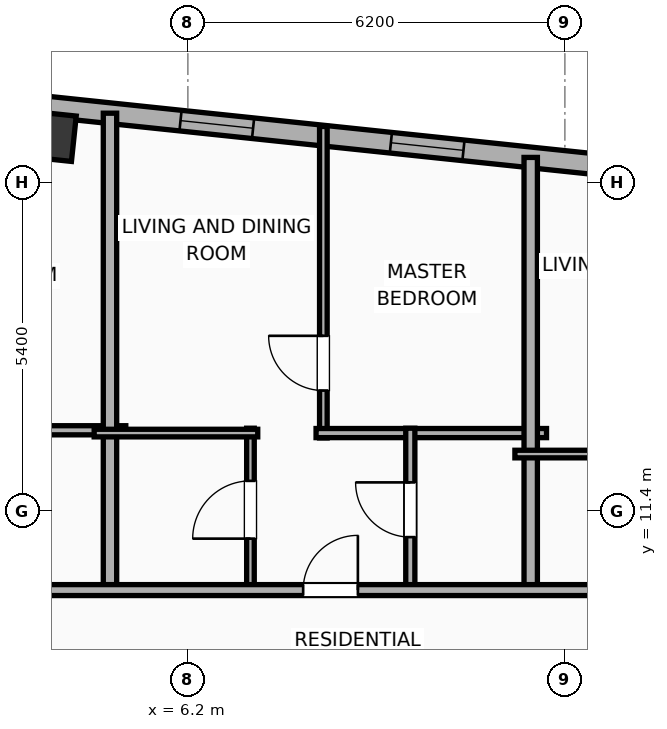
"""IFC4 building model, lengths in metres.
Left out: names, types, materials, properties, quantities, classifications, styles, units other than length and angle.
Written with IfcOpenShell. Run it as: python <this file> out.ifc"""

import sys

from ifc_helpers import new_model, si_unit, direction, frame, frame_2d, origin, origin_2d, place, context, subcontext, project, spatial, rectangle, hollow_rectangle, extrude, element, fill, save


model = new_model("IFC4")
c1 = context("Model", 3, precision=1e-05, world=origin(), true_north=direction((0.0, 1.0)))
c2 = subcontext(c1, "Body", "Model", "MODEL_VIEW")
j1 = project(units=[si_unit("LENGTHUNIT", "METRE"), si_unit("PLANEANGLEUNIT", "RADIAN")], contexts=[c1])
p1 = place(None, origin())
s1 = spatial("IfcSite", under=j1, at=p1, CompositionType="ELEMENT")
p2 = place(p1, origin())
s2 = spatial("IfcBuilding", under=s1, at=p2, CompositionType="ELEMENT")
p3 = place(p2, frame((0.0, 0.0, 299.0)))
s3 = spatial("IfcBuildingStorey", under=s2, at=p3, CompositionType="ELEMENT", Elevation=299.0)
p4 = place(p3, frame((3.952, 17.561, 0.0), z_axis=(0.0, 0.0, 1.0), x_axis=(0.994521895368, -0.104528463268, 0.0)))
e1 = element("IfcColumn", 1, at=p4, inside=s3, PredefinedType="COLUMN", context=c2, shape_type="SweptSolid", body=[
    extrude(hollow_rectangle(XDim=0.75, YDim=0.75, WallThickness=0.025, at=origin_2d()), origin(), (0.0, 0.0, 1.0), 3.9),
])
p5 = place(p3, frame((-23.908, 20.972, 0.0), z_axis=(0.0, 0.0, 1.0), x_axis=(0.994521888554, -0.104528528102, 0.0)))
e2 = element("IfcWall", 2, at=p5, inside=s3, PredefinedType="ELEMENTEDWALL", context=c2, shape_type="SweptSolid", body=[
    extrude(rectangle(XDim=46.766, YDim=0.34, at=frame_2d((23.383, 0.0))), origin(), (0.0, 0.0, 1.0), 3.635),
])
p6 = place(p5, frame((5.644, 0.0, 0.65)))
e3 = element("IfcOpeningElement", 3, at=p6, cuts=e2, PredefinedType="OPENING", context=c2, shape_type="SweptSolid", body=[
    extrude(rectangle(XDim=2.6, YDim=2.45, at=frame_2d((1.3, 1.225))), frame((0.0, 0.18, 0.0), z_axis=(0.0, -1.0, 0.0), x_axis=(1.0, 0.0, 0.0)), (0.0, 0.0, 1.0), 0.36),
])
p7 = place(p5, frame((3.05, 0.0, 0.75)))
e4 = element("IfcOpeningElement", 4, at=p7, cuts=e2, PredefinedType="OPENING", context=c2, shape_type="SweptSolid", body=[
    extrude(rectangle(XDim=1.2, YDim=2.05, at=frame_2d((0.6, 1.025))), frame((0.0, 0.18, 0.0), z_axis=(0.0, -1.0, 0.0), x_axis=(1.0, 0.0, 0.0)), (0.0, 0.0, 1.0), 0.36),
])
p8 = place(p5, frame((9.957, 0.0, 0.75)))
e5 = element("IfcOpeningElement", 5, at=p8, cuts=e2, PredefinedType="OPENING", context=c2, shape_type="SweptSolid", body=[
    extrude(rectangle(XDim=1.2, YDim=2.05, at=frame_2d((0.6, 1.025))), frame((0.0, 0.18, 0.0), z_axis=(0.0, -1.0, 0.0), x_axis=(1.0, 0.0, 0.0)), (0.0, 0.0, 1.0), 0.36),
])
p9 = place(p5, frame((13.05, 0.0, 0.75)))
e6 = element("IfcOpeningElement", 6, at=p9, cuts=e2, PredefinedType="OPENING", context=c2, shape_type="SweptSolid", body=[
    extrude(rectangle(XDim=1.2, YDim=2.05, at=frame_2d((0.6, 1.025))), frame((0.0, 0.18, 0.0), z_axis=(0.0, -1.0, 0.0), x_axis=(1.0, 0.0, 0.0)), (0.0, 0.0, 1.0), 0.36),
])
p10 = place(p5, frame((16.383, 0.0, 0.75)))
e7 = element("IfcOpeningElement", 7, at=p10, cuts=e2, PredefinedType="OPENING", context=c2, shape_type="SweptSolid", body=[
    extrude(rectangle(XDim=1.2, YDim=2.05, at=frame_2d((0.6, 1.025))), frame((0.0, 0.18, 0.0), z_axis=(0.0, -1.0, 0.0), x_axis=(1.0, 0.0, 0.0)), (0.0, 0.0, 1.0), 0.36),
])
p11 = place(p5, frame((19.716, 0.0, 0.75)))
e8 = element("IfcOpeningElement", 8, at=p11, cuts=e2, PredefinedType="OPENING", context=c2, shape_type="SweptSolid", body=[
    extrude(rectangle(XDim=1.2, YDim=2.05, at=frame_2d((0.6, 1.025))), frame((0.0, 0.18, 0.0), z_axis=(0.0, -1.0, 0.0), x_axis=(1.0, 0.0, 0.0)), (0.0, 0.0, 1.0), 0.36),
])
p12 = place(p5, frame((23.195, 0.0, 0.75)))
e9 = element("IfcOpeningElement", 9, at=p12, cuts=e2, PredefinedType="OPENING", context=c2, shape_type="SweptSolid", body=[
    extrude(rectangle(XDim=1.2, YDim=2.05, at=frame_2d((0.6, 1.025))), frame((0.0, 0.18, 0.0), z_axis=(0.0, -1.0, 0.0), x_axis=(1.0, 0.0, 0.0)), (0.0, 0.0, 1.0), 0.36),
])
p13 = place(p5, frame((26.194, 0.0, 0.75)))
e10 = element("IfcOpeningElement", 10, at=p13, cuts=e2, PredefinedType="OPENING", context=c2, shape_type="SweptSolid", body=[
    extrude(rectangle(XDim=1.2, YDim=2.05, at=frame_2d((0.6, 1.025))), frame((0.0, 0.18, 0.0), z_axis=(0.0, -1.0, 0.0), x_axis=(1.0, 0.0, 0.0)), (0.0, 0.0, 1.0), 0.36),
])
p14 = place(p5, frame((30.152, 0.0, 0.75)))
e11 = element("IfcOpeningElement", 11, at=p14, cuts=e2, PredefinedType="OPENING", context=c2, shape_type="SweptSolid", body=[
    extrude(rectangle(XDim=1.2, YDim=2.05, at=frame_2d((0.6, 1.025))), frame((0.0, 0.18, 0.0), z_axis=(0.0, -1.0, 0.0), x_axis=(1.0, 0.0, 0.0)), (0.0, 0.0, 1.0), 0.36),
])
p15 = place(p5, frame((33.631, 0.0, 0.75)))
e12 = element("IfcOpeningElement", 12, at=p15, cuts=e2, PredefinedType="OPENING", context=c2, shape_type="SweptSolid", body=[
    extrude(rectangle(XDim=1.2, YDim=2.05, at=frame_2d((0.6, 1.025))), frame((0.0, 0.18, 0.0), z_axis=(0.0, -1.0, 0.0), x_axis=(1.0, 0.0, 0.0)), (0.0, 0.0, 1.0), 0.36),
])
p16 = place(p5, frame((38.07, 0.0, 0.75)))
e13 = element("IfcOpeningElement", 13, at=p16, cuts=e2, PredefinedType="OPENING", context=c2, shape_type="SweptSolid", body=[
    extrude(rectangle(XDim=1.2, YDim=2.05, at=frame_2d((0.6, 1.025))), frame((0.0, 0.18, 0.0), z_axis=(0.0, -1.0, 0.0), x_axis=(1.0, 0.0, 0.0)), (0.0, 0.0, 1.0), 0.36),
])
p17 = place(p5, frame((40.589, 0.0, 0.75)))
e14 = element("IfcOpeningElement", 14, at=p17, cuts=e2, PredefinedType="OPENING", context=c2, shape_type="SweptSolid", body=[
    extrude(rectangle(XDim=1.2, YDim=2.05, at=frame_2d((0.6, 1.025))), frame((0.0, 0.18, 0.0), z_axis=(0.0, -1.0, 0.0), x_axis=(1.0, 0.0, 0.0)), (0.0, 0.0, 1.0), 0.36),
])
p18 = place(p5, frame((43.789, 0.0, 0.75)))
e15 = element("IfcOpeningElement", 15, at=p18, cuts=e2, PredefinedType="OPENING", context=c2, shape_type="SweptSolid", body=[
    extrude(rectangle(XDim=1.2, YDim=2.05, at=frame_2d((0.6, 1.025))), frame((0.0, 0.18, 0.0), z_axis=(0.0, -1.0, 0.0), x_axis=(1.0, 0.0, 0.0)), (0.0, 0.0, 1.0), 0.36),
])
p19 = place(p3, frame((1.389, 12.728, 0.0), z_axis=(0.0, 0.0, 1.0), x_axis=(1.0, 0.0, 0.0)))
e16 = element("IfcWall", 16, at=p19, inside=s3, PredefinedType="PLUMBINGWALL", context=c2, shape_type="SweptSolid", body=[
    extrude(rectangle(XDim=3.79, YDim=0.15, at=frame_2d((1.895, 0.0))), origin(), (0.0, 0.0, 1.0), 3.635),
])
p20 = place(p3, frame((4.919, 10.02, 0.0), z_axis=(0.0, 0.0, 1.0), x_axis=(0.0, 1.0, 0.0)))
e17 = element("IfcWall", 17, at=p20, inside=s3, PredefinedType="PARTITIONING", context=c2, shape_type="SweptSolid", body=[
    extrude(rectangle(XDim=7.922, YDim=0.22, at=frame_2d((3.961, 0.0))), origin(), (0.0, 0.0, 1.0), 3.635),
])
p21 = place(p3, frame((8.428, 12.602, 0.0), z_axis=(0.0, 0.0, 1.0), x_axis=(0.0, 1.0, 0.0)))
e18 = element("IfcWall", 18, at=p21, inside=s3, PredefinedType="PARTITIONING", context=c2, shape_type="SweptSolid", body=[
    extrude(rectangle(XDim=5.122, YDim=0.125, at=frame_2d((2.561, 0.0))), origin(), (0.0, 0.0, 1.0), 3.635),
])
p22 = place(p21, frame((0.779, 0.0, 0.0)))
e19 = element("IfcOpeningElement", 19, at=p22, cuts=e18, PredefinedType="OPENING", context=c2, shape_type="SweptSolid", body=[
    extrude(rectangle(XDim=0.9, YDim=2.05, at=frame_2d((0.45, 1.025))), frame((0.0, 0.073, 0.0), z_axis=(0.0, -1.0, 0.0), x_axis=(1.0, 0.0, 0.0)), (0.0, 0.0, 1.0), 0.145),
])
p23 = place(p3, frame((8.308, 12.682, 0.0), z_axis=(0.0, 0.0, 1.0), x_axis=(1.0, 0.0, 0.0)))
e20 = element("IfcWall", 20, at=p23, inside=s3, PredefinedType="PLUMBINGWALL", context=c2, shape_type="SweptSolid", body=[
    extrude(rectangle(XDim=3.79, YDim=0.15, at=frame_2d((1.895, 0.0))), origin(), (0.0, 0.0, 1.0), 3.635),
])
p24 = place(p3, frame((7.229, 10.08, 0.0), z_axis=(0.0, 0.0, 1.0), x_axis=(0.0, 1.0, 0.0)))
e21 = element("IfcWall", 21, at=p24, inside=s3, PredefinedType="PARTITIONING", context=c2, shape_type="SweptSolid", body=[
    extrude(rectangle(XDim=2.682, YDim=0.125, at=frame_2d((1.341, 0.0))), origin(), (0.0, 0.0, 1.0), 3.635),
])
p25 = place(p24, frame((0.866, 0.0, 0.0)))
e22 = element("IfcOpeningElement", 22, at=p25, cuts=e21, PredefinedType="OPENING", context=c2, shape_type="SweptSolid", body=[
    extrude(rectangle(XDim=0.95, YDim=2.05, at=frame_2d((0.475, 1.025))), frame((0.0, 0.073, 0.0), z_axis=(0.0, -1.0, 0.0), x_axis=(1.0, 0.0, 0.0)), (0.0, 0.0, 1.0), 0.145),
])
p26 = place(p3, frame((4.659, 12.682, 0.0), z_axis=(0.0, 0.0, 1.0), x_axis=(1.0, 0.0, 0.0)))
e23 = element("IfcWall", 23, at=p26, inside=s3, PredefinedType="PARTITIONING", context=c2, shape_type="SweptSolid", body=[
    extrude(rectangle(XDim=2.69, YDim=0.125, at=frame_2d((1.345, 0.0))), origin(), (0.0, 0.0, 1.0), 3.635),
])
p27 = place(p3, frame((9.858, 10.08, 0.0), z_axis=(0.0, 0.0, 1.0), x_axis=(0.0, 1.0, 0.0)))
e24 = element("IfcWall", 24, at=p27, inside=s3, PredefinedType="PLUMBINGWALL", context=c2, shape_type="SweptSolid", body=[
    extrude(rectangle(XDim=2.682, YDim=0.15, at=frame_2d((1.341, 0.0))), origin(), (0.0, 0.0, 1.0), 3.635),
])
p28 = place(p27, frame((0.891, 0.0, 0.0)))
e25 = element("IfcOpeningElement", 25, at=p28, cuts=e24, PredefinedType="OPENING", context=c2, shape_type="SweptSolid", body=[
    extrude(rectangle(XDim=0.9, YDim=2.05, at=frame_2d((0.45, 1.025))), frame((0.0, 0.085, 0.0), z_axis=(0.0, -1.0, 0.0), x_axis=(1.0, 0.0, 0.0)), (0.0, 0.0, 1.0), 0.17),
])
p29 = place(p3, frame((11.838, 10.02, 0.0), z_axis=(0.0, 0.0, 1.0), x_axis=(0.0, 1.0, 0.0)))
e26 = element("IfcWall", 26, at=p29, inside=s3, PredefinedType="PARTITIONING", context=c2, shape_type="SweptSolid", body=[
    extrude(rectangle(XDim=7.195, YDim=0.22, at=frame_2d((3.598, 0.0))), origin(), (0.0, 0.0, 1.0), 3.635),
])
p30 = place(p3, frame((11.578, 12.337, 0.0), z_axis=(0.0, 0.0, 1.0), x_axis=(1.0, 0.0, 0.0)))
e27 = element("IfcWall", 27, at=p30, inside=s3, PredefinedType="PARTITIONING", context=c2, shape_type="SweptSolid", body=[
    extrude(rectangle(XDim=2.69, YDim=0.125, at=frame_2d((1.345, 0.0))), origin(), (0.0, 0.0, 1.0), 3.635),
])
p31 = place(p3, frame((-28.516, 10.1, 0.0), z_axis=(0.0, 0.0, 1.0), x_axis=(1.0, 0.0, 0.0)))
e28 = element("IfcWall", 28, at=p31, inside=s3, PredefinedType="PARTITIONING", context=c2, shape_type="SweptSolid", body=[
    extrude(rectangle(XDim=53.955, YDim=0.18, at=frame_2d((26.978, 0.0))), origin(), (0.0, 0.0, 1.0), 3.635),
])
p32 = place(p31, frame((2.998, 0.0, 0.0)))
e29 = element("IfcOpeningElement", 29, at=p32, cuts=e28, PredefinedType="OPENING", context=c2, shape_type="SweptSolid", body=[
    extrude(rectangle(XDim=0.9, YDim=2.05, at=frame_2d((0.45, 1.025))), frame((0.0, 0.1, 0.0), z_axis=(0.0, -1.0, 0.0), x_axis=(1.0, 0.0, 0.0)), (0.0, 0.0, 1.0), 0.2),
])
p33 = place(p31, frame((9.656, 0.0, 0.0)))
e30 = element("IfcOpeningElement", 30, at=p33, cuts=e28, PredefinedType="OPENING", context=c2, shape_type="SweptSolid", body=[
    extrude(rectangle(XDim=0.9, YDim=2.05, at=frame_2d((0.45, 1.025))), frame((0.0, 0.1, 0.0), z_axis=(0.0, -1.0, 0.0), x_axis=(1.0, 0.0, 0.0)), (0.0, 0.0, 1.0), 0.2),
])
p34 = place(p31, frame((16.287, 0.0, 0.0)))
e31 = element("IfcOpeningElement", 31, at=p34, cuts=e28, PredefinedType="OPENING", context=c2, shape_type="SweptSolid", body=[
    extrude(rectangle(XDim=0.9, YDim=2.05, at=frame_2d((0.45, 1.025))), frame((0.0, 0.1, 0.0), z_axis=(0.0, -1.0, 0.0), x_axis=(1.0, 0.0, 0.0)), (0.0, 0.0, 1.0), 0.2),
])
p35 = place(p31, frame((22.918, 0.0, 0.0)))
e32 = element("IfcOpeningElement", 32, at=p35, cuts=e28, PredefinedType="OPENING", context=c2, shape_type="SweptSolid", body=[
    extrude(rectangle(XDim=0.9, YDim=2.05, at=frame_2d((0.45, 1.025))), frame((0.0, 0.1, 0.0), z_axis=(0.0, -1.0, 0.0), x_axis=(1.0, 0.0, 0.0)), (0.0, 0.0, 1.0), 0.2),
])
p36 = place(p31, frame((29.689, 0.0, 0.0)))
e33 = element("IfcOpeningElement", 33, at=p36, cuts=e28, PredefinedType="OPENING", context=c2, shape_type="SweptSolid", body=[
    extrude(rectangle(XDim=0.9, YDim=2.05, at=frame_2d((0.45, 1.025))), frame((0.0, 0.1, 0.0), z_axis=(0.0, -1.0, 0.0), x_axis=(1.0, 0.0, 0.0)), (0.0, 0.0, 1.0), 0.2),
])
p37 = place(p31, frame((36.612, 0.0, 0.0)))
e34 = element("IfcOpeningElement", 34, at=p37, cuts=e28, PredefinedType="OPENING", context=c2, shape_type="SweptSolid", body=[
    extrude(rectangle(XDim=0.9, YDim=2.05, at=frame_2d((0.45, 1.025))), frame((0.0, 0.1, 0.0), z_axis=(0.0, -1.0, 0.0), x_axis=(1.0, 0.0, 0.0)), (0.0, 0.0, 1.0), 0.2),
])
p38 = place(p31, frame((43.529, 0.0, 0.0)))
e35 = element("IfcOpeningElement", 35, at=p38, cuts=e28, PredefinedType="OPENING", context=c2, shape_type="SweptSolid", body=[
    extrude(rectangle(XDim=0.9, YDim=2.05, at=frame_2d((0.45, 1.025))), frame((0.0, 0.1, 0.0), z_axis=(0.0, -1.0, 0.0), x_axis=(1.0, 0.0, 0.0)), (0.0, 0.0, 1.0), 0.2),
])
p39 = place(p31, frame((50.452, 0.0, 0.0)))
e36 = element("IfcOpeningElement", 36, at=p39, cuts=e28, PredefinedType="OPENING", context=c2, shape_type="SweptSolid", body=[
    extrude(rectangle(XDim=0.9, YDim=2.05, at=frame_2d((0.45, 1.025))), frame((0.0, 0.1, 0.0), z_axis=(0.0, -1.0, 0.0), x_axis=(1.0, 0.0, 0.0)), (0.0, 0.0, 1.0), 0.2),
])
p40 = place(p14, origin())
e37 = element("IfcWindow", 37, at=p40, inside=s3, PartitioningType="SINGLE_PANEL", PredefinedType="WINDOW", context=c2, shape_type="SweptSolid", body=[
    extrude(rectangle(XDim=1.2, YDim=2.05, at=frame_2d((0.6, 1.025))), frame((0.0, 0.03, 0.0), z_axis=(0.0, -1.0, 0.0), x_axis=(1.0, 0.0, 0.0)), (0.0, 0.0, 1.0), 0.06),
])
fill(e11, e37)
p41 = place(p15, origin())
e38 = element("IfcWindow", 38, at=p41, inside=s3, PartitioningType="SINGLE_PANEL", PredefinedType="WINDOW", context=c2, shape_type="SweptSolid", body=[
    extrude(rectangle(XDim=1.2, YDim=2.05, at=frame_2d((0.6, 1.025))), frame((0.0, 0.03, 0.0), z_axis=(0.0, -1.0, 0.0), x_axis=(1.0, 0.0, 0.0)), (0.0, 0.0, 1.0), 0.06),
])
fill(e12, e38)
p42 = place(p22, origin())
e39 = element("IfcDoor", 39, at=p42, inside=s3, OperationType="SINGLE_SWING_RIGHT", PredefinedType="DOOR", context=c2, shape_type="SweptSolid", body=[
    extrude(rectangle(XDim=0.9, YDim=2.05, at=frame_2d((0.45, 1.025))), frame((0.0, 0.025, 0.0), z_axis=(0.0, -1.0, 0.0), x_axis=(1.0, 0.0, 0.0)), (0.0, 0.0, 1.0), 0.05),
])
fill(e19, e39)
p43 = place(p25, origin())
e40 = element("IfcDoor", 40, at=p43, inside=s3, OperationType="SINGLE_SWING_LEFT", PredefinedType="DOOR", context=c2, shape_type="SweptSolid", body=[
    extrude(rectangle(XDim=0.95, YDim=2.05, at=frame_2d((0.475, 1.025))), frame((0.0, 0.025, 0.0), z_axis=(0.0, -1.0, 0.0), x_axis=(1.0, 0.0, 0.0)), (0.0, 0.0, 1.0), 0.05),
])
fill(e22, e40)
p44 = place(p28, origin())
e41 = element("IfcDoor", 41, at=p44, inside=s3, OperationType="SINGLE_SWING_RIGHT", PredefinedType="DOOR", context=c2, shape_type="SweptSolid", body=[
    extrude(rectangle(XDim=0.9, YDim=2.05, at=frame_2d((0.45, 1.025))), frame((0.0, 0.025, 0.0), z_axis=(0.0, -1.0, 0.0), x_axis=(1.0, 0.0, 0.0)), (0.0, 0.0, 1.0), 0.05),
])
fill(e25, e41)
p45 = place(p37, origin())
e42 = element("IfcDoor", 42, at=p45, inside=s3, OperationType="SINGLE_SWING_RIGHT", PredefinedType="DOOR", context=c2, shape_type="SweptSolid", body=[
    extrude(rectangle(XDim=0.9, YDim=2.05, at=frame_2d((0.45, 1.025))), frame((0.0, 0.025, 0.0), z_axis=(0.0, -1.0, 0.0), x_axis=(1.0, 0.0, 0.0)), (0.0, 0.0, 1.0), 0.05),
])
fill(e34, e42)
save(model, sys.argv[1])
